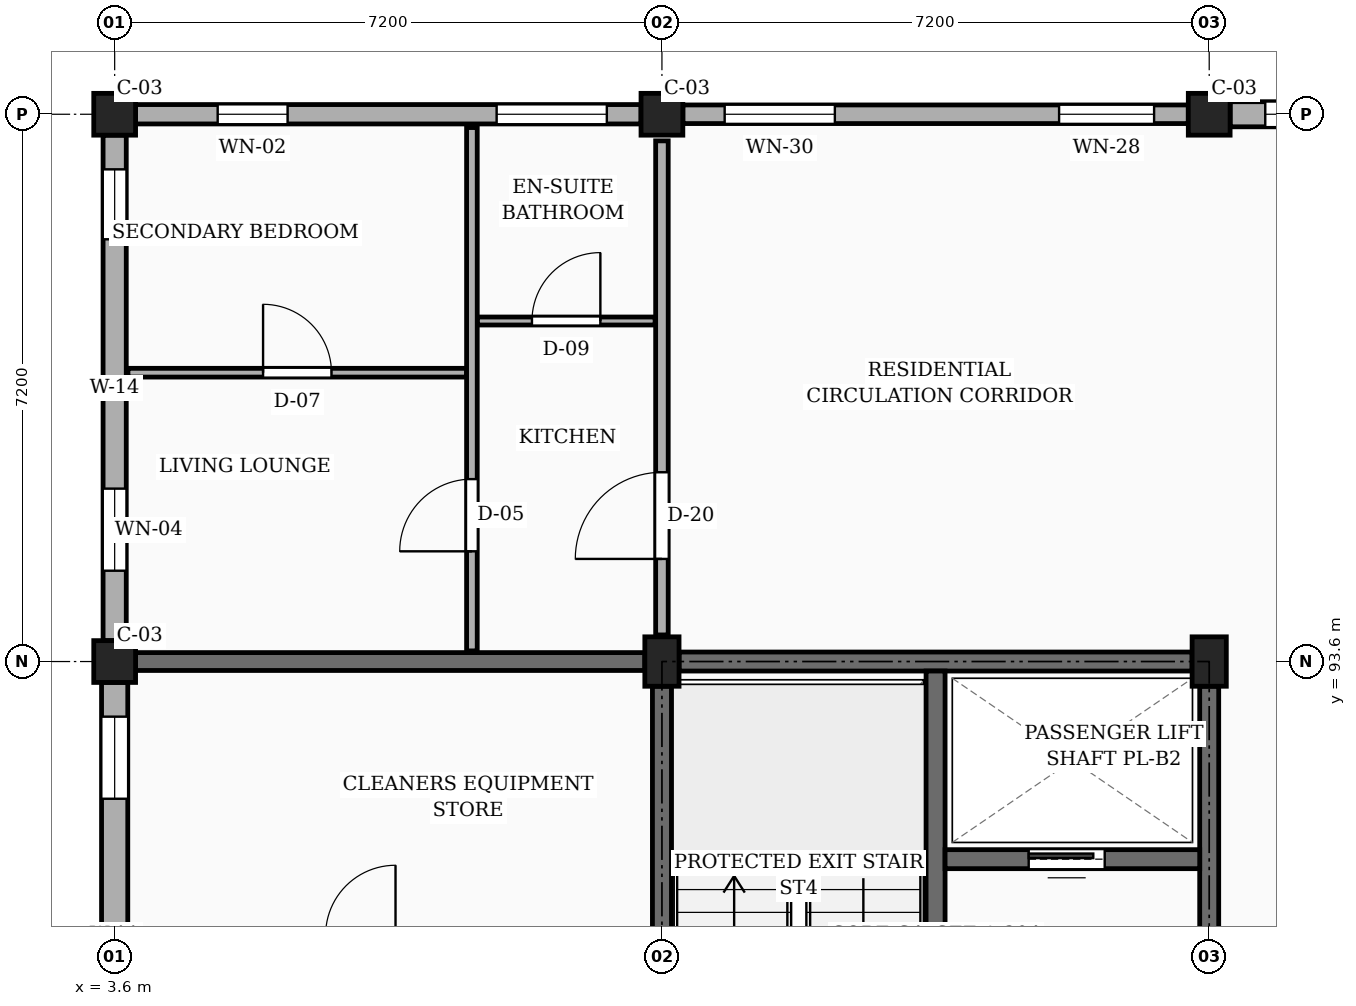
"""IFC4 building model, lengths in metres.
Left out: names, types, materials, properties, quantities, classifications, styles, units other than length and angle.
Written with IfcOpenShell. Run it as: python <this file> out.ifc"""

import sys

from ifc_helpers import new_model, si_unit, direction, frame, frame_2d, origin, origin_2d, place, context, subcontext, project, spatial, rectangle, extrude, element, fill, save


model = new_model("IFC4")
c1 = context("Model", 3, precision=1e-05, world=origin(), true_north=direction((0.0, 1.0)))
c2 = subcontext(c1, "Body", "Model", "MODEL_VIEW")
j1 = project(units=[si_unit("LENGTHUNIT", "METRE"), si_unit("PLANEANGLEUNIT", "RADIAN")], contexts=[c1])
p1 = place(None, origin())
s1 = spatial("IfcSite", under=j1, at=p1, CompositionType="ELEMENT")
p2 = place(p1, origin())
s2 = spatial("IfcBuilding", under=s1, at=p2, CompositionType="ELEMENT")
p3 = place(p2, frame((0.0, 0.0, 17.1)))
s3 = spatial("IfcBuildingStorey", under=s2, at=p3, CompositionType="ELEMENT", Elevation=17.1)
for number, where, z_axis, x_axis in (
    (1, (3.6, 93.6, 0.0), (0.0, 0.0, 1.0), (1.0, 0.0, 0.0)),
    (2, (3.6, 100.8, 0.0), (0.0, 0.0, 1.0), (1.0, 0.0, 0.0)),
):
    element("IfcColumn", number, at=place(p3, frame(where, z_axis=z_axis, x_axis=x_axis)), inside=s3, PredefinedType="COLUMN", context=c2, shape_type="SweptSolid", body=[
        extrude(rectangle(XDim=0.55, YDim=0.55, at=origin_2d()), origin(), (0.0, 0.0, 1.0), 3.15),
    ])
p4 = place(p3, frame((10.8, 93.6, 0.0), z_axis=(0.0, 0.0, 1.0), x_axis=(1.0, 0.0, 0.0)))
e3 = element("IfcColumn", 3, at=p4, inside=s3, PredefinedType="COLUMN", context=c2, shape_type="SweptSolid", body=[
    extrude(rectangle(XDim=0.45, YDim=0.65, at=origin_2d()), origin(), (0.0, 0.0, 1.0), 3.15),
])
p5 = place(p3, frame((10.8, 100.8, 0.0), z_axis=(0.0, 0.0, 1.0), x_axis=(1.0, 0.0, 0.0)))
e4 = element("IfcColumn", 4, at=p5, inside=s3, PredefinedType="COLUMN", context=c2, shape_type="SweptSolid", body=[
    extrude(rectangle(XDim=0.55, YDim=0.55, at=origin_2d()), origin(), (0.0, 0.0, 1.0), 3.15),
])
p6 = place(p3, frame((18.0, 93.6, 0.0), z_axis=(0.0, 0.0, 1.0), x_axis=(1.0, 0.0, 0.0)))
e5 = element("IfcColumn", 5, at=p6, inside=s3, PredefinedType="COLUMN", context=c2, shape_type="SweptSolid", body=[
    extrude(rectangle(XDim=0.45, YDim=0.65, at=origin_2d()), origin(), (0.0, 0.0, 1.0), 3.15),
])
p7 = place(p3, frame((18.0, 100.8, 0.0), z_axis=(0.0, 0.0, 1.0), x_axis=(1.0, 0.0, 0.0)))
e6 = element("IfcColumn", 6, at=p7, inside=s3, PredefinedType="COLUMN", context=c2, shape_type="SweptSolid", body=[
    extrude(rectangle(XDim=0.55, YDim=0.55, at=origin_2d()), origin(), (0.0, 0.0, 1.0), 3.15),
])
p8 = place(p3, frame((3.875, 93.6, 0.0), z_axis=(0.0, 0.0, 1.0), x_axis=(1.0, 0.0, 0.0)))
e7 = element("IfcWall", 7, at=p8, inside=s3, PredefinedType="SOLIDWALL", context=c2, shape_type="SweptSolid", body=[
    extrude(rectangle(XDim=6.7, YDim=0.235, at=frame_2d((3.35, 0.0))), origin(), (0.0, 0.0, 1.0), 2.21),
])
p9 = place(p3, frame((24.925, 100.8, 0.0), z_axis=(0.0, 0.0, 1.0), x_axis=(-1.0, 0.0, 0.0)))
e8 = element("IfcWall", 8, at=p9, inside=s3, PredefinedType="SOLIDWALL", context=c2, shape_type="SweptSolid", body=[
    extrude(rectangle(XDim=6.65, YDim=0.33, at=frame_2d((3.325, 0.0))), origin(), (0.0, 0.0, 1.0), 2.48),
])
p10 = place(p9, frame((1.042, 0.0, 0.78)))
e9 = element("IfcOpeningElement", 9, at=p10, cuts=e8, PredefinedType="OPENING", context=c2, shape_type="SweptSolid", body=[
    extrude(rectangle(XDim=0.94, YDim=1.44, at=frame_2d((0.47, 0.72))), frame((0.0, 0.175, 0.0), z_axis=(0.0, -1.0, 0.0), x_axis=(1.0, 0.0, 0.0)), (0.0, 0.0, 1.0), 0.35),
])
p11 = place(p9, frame((3.28, 0.0, 0.78)))
e10 = element("IfcOpeningElement", 10, at=p11, cuts=e8, PredefinedType="OPENING", context=c2, shape_type="SweptSolid", body=[
    extrude(rectangle(XDim=1.15, YDim=1.44, at=frame_2d((0.575, 0.72))), frame((0.0, 0.175, 0.0), z_axis=(0.0, -1.0, 0.0), x_axis=(1.0, 0.0, 0.0)), (0.0, 0.0, 1.0), 0.35),
])
p12 = place(p9, frame((5.147, 0.0, 0.78)))
e11 = element("IfcOpeningElement", 11, at=p12, cuts=e8, PredefinedType="OPENING", context=c2, shape_type="SweptSolid", body=[
    extrude(rectangle(XDim=1.04, YDim=1.26, at=frame_2d((0.52, 0.63))), frame((0.0, 0.175, 0.0), z_axis=(0.0, -1.0, 0.0), x_axis=(1.0, 0.0, 0.0)), (0.0, 0.0, 1.0), 0.35),
])
p13 = place(p3, frame((17.725, 100.8, 0.0), z_axis=(0.0, 0.0, 1.0), x_axis=(-1.0, 0.0, 0.0)))
e12 = element("IfcWall", 12, at=p13, inside=s3, PredefinedType="SOLIDWALL", context=c2, shape_type="SweptSolid", body=[
    extrude(rectangle(XDim=6.65, YDim=0.245, at=frame_2d((3.325, 0.0))), origin(), (0.0, 0.0, 1.0), 2.48),
])
p14 = place(p13, frame((0.45, 0.0, 0.78)))
e13 = element("IfcOpeningElement", 13, at=p14, cuts=e12, PredefinedType="OPENING", context=c2, shape_type="SweptSolid", body=[
    extrude(rectangle(XDim=1.25, YDim=1.44, at=frame_2d((0.625, 0.72))), frame((0.0, 0.133, 0.0), z_axis=(0.0, -1.0, 0.0), x_axis=(1.0, 0.0, 0.0)), (0.0, 0.0, 1.0), 0.265),
])
p15 = place(p13, frame((4.65, 0.0, 0.78)))
e14 = element("IfcOpeningElement", 14, at=p15, cuts=e12, PredefinedType="OPENING", context=c2, shape_type="SweptSolid", body=[
    extrude(rectangle(XDim=1.45, YDim=1.44, at=frame_2d((0.725, 0.72))), frame((0.0, 0.133, 0.0), z_axis=(0.0, -1.0, 0.0), x_axis=(1.0, 0.0, 0.0)), (0.0, 0.0, 1.0), 0.265),
])
p16 = place(p3, frame((10.525, 100.8, 0.0), z_axis=(0.0, 0.0, 1.0), x_axis=(-1.0, 0.0, 0.0)))
e15 = element("IfcWall", 15, at=p16, inside=s3, PredefinedType="SOLIDWALL", context=c2, shape_type="SweptSolid", body=[
    extrude(rectangle(XDim=6.65, YDim=0.255, at=frame_2d((3.325, 0.0))), origin(), (0.0, 0.0, 1.0), 2.48),
])
p17 = place(p16, frame((0.45, 0.0, 0.78)))
e16 = element("IfcOpeningElement", 16, at=p17, cuts=e15, PredefinedType="OPENING", context=c2, shape_type="SweptSolid", body=[
    extrude(rectangle(XDim=1.45, YDim=1.44, at=frame_2d((0.725, 0.72))), frame((0.0, 0.137, 0.0), z_axis=(0.0, -1.0, 0.0), x_axis=(1.0, 0.0, 0.0)), (0.0, 0.0, 1.0), 0.275),
])
p18 = place(p16, frame((4.65, 0.0, 0.78)))
e17 = element("IfcOpeningElement", 17, at=p18, cuts=e15, PredefinedType="OPENING", context=c2, shape_type="SweptSolid", body=[
    extrude(rectangle(XDim=0.92, YDim=1.15, at=frame_2d((0.46, 0.575))), frame((0.0, 0.137, 0.0), z_axis=(0.0, -1.0, 0.0), x_axis=(1.0, 0.0, 0.0)), (0.0, 0.0, 1.0), 0.275),
])
p19 = place(p3, frame((3.6, 100.525, 0.0), z_axis=(0.0, 0.0, 1.0), x_axis=(0.0, -1.0, 0.0)))
e18 = element("IfcWall", 18, at=p19, inside=s3, PredefinedType="SOLIDWALL", context=c2, shape_type="SweptSolid", body=[
    extrude(rectangle(XDim=6.65, YDim=0.305, at=frame_2d((3.325, 0.0))), origin(), (0.0, 0.0, 1.0), 2.48),
])
p20 = place(p19, frame((0.45, 0.0, 0.78)))
e19 = element("IfcOpeningElement", 19, at=p20, cuts=e18, PredefinedType="OPENING", context=c2, shape_type="SweptSolid", body=[
    extrude(rectangle(XDim=0.92, YDim=1.15, at=frame_2d((0.46, 0.575))), frame((0.0, 0.163, 0.0), z_axis=(0.0, -1.0, 0.0), x_axis=(1.0, 0.0, 0.0)), (0.0, 0.0, 1.0), 0.325),
])
p21 = place(p19, frame((4.65, 0.0, 0.78)))
e20 = element("IfcOpeningElement", 20, at=p21, cuts=e18, PredefinedType="OPENING", context=c2, shape_type="SweptSolid", body=[
    extrude(rectangle(XDim=1.08, YDim=1.15, at=frame_2d((0.54, 0.575))), frame((0.0, 0.163, 0.0), z_axis=(0.0, -1.0, 0.0), x_axis=(1.0, 0.0, 0.0)), (0.0, 0.0, 1.0), 0.325),
])
p22 = place(p3, frame((3.6, 93.325, 0.0), z_axis=(0.0, 0.0, 1.0), x_axis=(0.0, -1.0, 0.0)))
e21 = element("IfcWall", 21, at=p22, inside=s3, PredefinedType="SOLIDWALL", context=c2, shape_type="SweptSolid", body=[
    extrude(rectangle(XDim=6.65, YDim=0.345, at=frame_2d((3.325, 0.0))), origin(), (0.0, 0.0, 1.0), 2.48),
])
p23 = place(p22, frame((0.45, 0.0, 0.78)))
e22 = element("IfcOpeningElement", 22, at=p23, cuts=e21, PredefinedType="OPENING", context=c2, shape_type="SweptSolid", body=[
    extrude(rectangle(XDim=1.08, YDim=1.15, at=frame_2d((0.54, 0.575))), frame((0.0, 0.183, 0.0), z_axis=(0.0, -1.0, 0.0), x_axis=(1.0, 0.0, 0.0)), (0.0, 0.0, 1.0), 0.365),
])
p24 = place(p22, frame((4.65, 0.0, 0.78)))
e23 = element("IfcOpeningElement", 23, at=p24, cuts=e21, PredefinedType="OPENING", context=c2, shape_type="SweptSolid", body=[
    extrude(rectangle(XDim=1.24, YDim=1.15, at=frame_2d((0.62, 0.575))), frame((0.0, 0.183, 0.0), z_axis=(0.0, -1.0, 0.0), x_axis=(1.0, 0.0, 0.0)), (0.0, 0.0, 1.0), 0.365),
])
p25 = place(p3, frame((10.8, 86.725, 0.0), z_axis=(0.0, 0.0, 1.0), x_axis=(0.0, 1.0, 0.0)))
e24 = element("IfcWall", 24, at=p25, inside=s3, PredefinedType="SHEAR", context=c2, shape_type="SweptSolid", body=[
    extrude(rectangle(XDim=6.55, YDim=0.25, at=frame_2d((3.275, 0.0))), origin(), (0.0, 0.0, 1.0), 2.91),
])
p26 = place(p3, frame((11.025, 93.6, 0.0), z_axis=(0.0, 0.0, 1.0), x_axis=(1.0, 0.0, 0.0)))
e25 = element("IfcWall", 25, at=p26, inside=s3, PredefinedType="SHEAR", context=c2, shape_type="SweptSolid", body=[
    extrude(rectangle(XDim=6.75, YDim=0.25, at=frame_2d((3.375, 0.0))), origin(), (0.0, 0.0, 1.0), 2.91),
])
p27 = place(p3, frame((18.0, 86.725, 0.0), z_axis=(0.0, 0.0, 1.0), x_axis=(0.0, 1.0, 0.0)))
e26 = element("IfcWall", 26, at=p27, inside=s3, PredefinedType="SHEAR", context=c2, shape_type="SweptSolid", body=[
    extrude(rectangle(XDim=6.55, YDim=0.25, at=frame_2d((3.275, 0.0))), origin(), (0.0, 0.0, 1.0), 2.91),
])
p28 = place(p27, frame((1.5, 0.0, 0.0)))
e27 = element("IfcOpeningElement", 27, at=p28, cuts=e26, PredefinedType="OPENING", context=c2, shape_type="SweptSolid", body=[
    extrude(rectangle(XDim=1.1, YDim=2.15, at=frame_2d((0.55, 1.075))), frame((0.0, 0.135, 0.0), z_axis=(0.0, -1.0, 0.0), x_axis=(1.0, 0.0, 0.0)), (0.0, 0.0, 1.0), 0.27),
])
p29 = place(p3, frame((14.4, 86.525, 0.0), z_axis=(0.0, 0.0, 1.0), x_axis=(0.0, 1.0, 0.0)))
e28 = element("IfcWall", 28, at=p29, inside=s3, PredefinedType="SHEAR", context=c2, shape_type="SweptSolid", body=[
    extrude(rectangle(XDim=6.95, YDim=0.25, at=frame_2d((3.475, 0.0))), origin(), (0.0, 0.0, 1.0), 2.91),
])
p30 = place(p29, frame((0.475, 0.0, 0.0)))
e29 = element("IfcOpeningElement", 29, at=p30, cuts=e28, PredefinedType="OPENING", context=c2, shape_type="SweptSolid", body=[
    extrude(rectangle(XDim=1.05, YDim=2.15, at=frame_2d((0.525, 1.075))), frame((0.0, 0.135, 0.0), z_axis=(0.0, -1.0, 0.0), x_axis=(1.0, 0.0, 0.0)), (0.0, 0.0, 1.0), 0.27),
])
p31 = place(p3, frame((14.525, 91.0, 0.0), z_axis=(0.0, 0.0, 1.0), x_axis=(1.0, 0.0, 0.0)))
e30 = element("IfcWall", 30, at=p31, inside=s3, PredefinedType="SHEAR", context=c2, shape_type="SweptSolid", body=[
    extrude(rectangle(XDim=3.35, YDim=0.25, at=frame_2d((1.675, 0.0))), origin(), (0.0, 0.0, 1.0), 2.91),
])
p32 = place(p31, frame((1.1, 0.0, 0.0)))
e31 = element("IfcOpeningElement", 31, at=p32, cuts=e30, PredefinedType="OPENING", context=c2, shape_type="SweptSolid", body=[
    extrude(rectangle(XDim=1.0, YDim=2.2, at=frame_2d((0.5, 1.1))), frame((0.0, 0.135, 0.0), z_axis=(0.0, -1.0, 0.0), x_axis=(1.0, 0.0, 0.0)), (0.0, 0.0, 1.0), 0.27),
])
p33 = place(p3, frame((10.8, 93.95, 0.0), z_axis=(0.0, 0.0, 1.0), x_axis=(0.0, 1.0, 0.0)))
e32 = element("IfcWall", 32, at=p33, inside=s3, PredefinedType="PARTITIONING", context=c2, shape_type="SweptSolid", body=[
    extrude(rectangle(XDim=6.5, YDim=0.165, at=frame_2d((3.25, 0.0))), origin(), (0.0, 0.0, 1.0), 2.345),
])
p34 = place(p33, frame((1.0, 0.0, 0.0)))
e33 = element("IfcOpeningElement", 33, at=p34, cuts=e32, PredefinedType="OPENING", context=c2, shape_type="SweptSolid", body=[
    extrude(rectangle(XDim=1.14, YDim=2.18, at=frame_2d((0.57, 1.09))), frame((0.0, 0.093, 0.0), z_axis=(0.0, -1.0, 0.0), x_axis=(1.0, 0.0, 0.0)), (0.0, 0.0, 1.0), 0.185),
])
p35 = place(p3, frame((3.775, 97.4, 0.0), z_axis=(0.0, 0.0, 1.0), x_axis=(1.0, 0.0, 0.0)))
e34 = element("IfcWall", 34, at=p35, inside=s3, PredefinedType="PARTITIONING", context=c2, shape_type="SweptSolid", body=[
    extrude(rectangle(XDim=4.455, YDim=0.115, at=frame_2d((2.228, 0.0))), origin(), (0.0, 0.0, 1.0), 2.345),
])
p36 = place(p35, frame((1.778, 0.0, 0.0)))
e35 = element("IfcOpeningElement", 35, at=p36, cuts=e34, PredefinedType="OPENING", context=c2, shape_type="SweptSolid", body=[
    extrude(rectangle(XDim=0.9, YDim=2.1, at=frame_2d((0.45, 1.05))), frame((0.0, 0.067, 0.0), z_axis=(0.0, -1.0, 0.0), x_axis=(1.0, 0.0, 0.0)), (0.0, 0.0, 1.0), 0.135),
])
p37 = place(p3, frame((8.37, 98.08, 0.0), z_axis=(0.0, 0.0, 1.0), x_axis=(1.0, 0.0, 0.0)))
e36 = element("IfcWall", 36, at=p37, inside=s3, PredefinedType="PARTITIONING", context=c2, shape_type="SweptSolid", body=[
    extrude(rectangle(XDim=2.34, YDim=0.105, at=frame_2d((1.17, 0.0))), origin(), (0.0, 0.0, 1.0), 2.345),
])
p38 = place(p37, frame((0.72, 0.0, 0.0)))
e37 = element("IfcOpeningElement", 37, at=p38, cuts=e36, PredefinedType="OPENING", context=c2, shape_type="SweptSolid", body=[
    extrude(rectangle(XDim=0.9, YDim=2.05, at=frame_2d((0.45, 1.025))), frame((0.0, 0.062, 0.0), z_axis=(0.0, -1.0, 0.0), x_axis=(1.0, 0.0, 0.0)), (0.0, 0.0, 1.0), 0.125),
])
p39 = place(p3, frame((8.3, 93.74, 0.0), z_axis=(0.0, 0.0, 1.0), x_axis=(0.0, 1.0, 0.0)))
e38 = element("IfcWall", 38, at=p39, inside=s3, PredefinedType="PARTITIONING", context=c2, shape_type="SweptSolid", body=[
    extrude(rectangle(XDim=6.885, YDim=0.14, at=frame_2d((3.442, 0.0))), origin(), (0.0, 0.0, 1.0), 2.345),
])
p40 = place(p39, frame((1.31, 0.0, 0.0)))
e39 = element("IfcOpeningElement", 39, at=p40, cuts=e38, PredefinedType="OPENING", context=c2, shape_type="SweptSolid", body=[
    extrude(rectangle(XDim=0.95, YDim=2.1, at=frame_2d((0.475, 1.05))), frame((0.0, 0.08, 0.0), z_axis=(0.0, -1.0, 0.0), x_axis=(1.0, 0.0, 0.0)), (0.0, 0.0, 1.0), 0.16),
])
p41 = place(p12, origin())
e40 = element("IfcWindow", 40, at=p41, inside=s3, PartitioningType="SINGLE_PANEL", PredefinedType="WINDOW", context=c2, shape_type="SweptSolid", body=[
    extrude(rectangle(XDim=1.04, YDim=1.26, at=frame_2d((0.52, 0.63))), frame((0.0, 0.03, 0.0), z_axis=(0.0, -1.0, 0.0), x_axis=(1.0, 0.0, 0.0)), (0.0, 0.0, 1.0), 0.06),
])
fill(e11, e40)
p42 = place(p14, origin())
e41 = element("IfcWindow", 41, at=p42, inside=s3, PartitioningType="SINGLE_PANEL", PredefinedType="WINDOW", context=c2, shape_type="SweptSolid", body=[
    extrude(rectangle(XDim=1.25, YDim=1.44, at=frame_2d((0.625, 0.72))), frame((0.0, 0.03, 0.0), z_axis=(0.0, -1.0, 0.0), x_axis=(1.0, 0.0, 0.0)), (0.0, 0.0, 1.0), 0.06),
])
fill(e13, e41)
p43 = place(p15, origin())
e42 = element("IfcWindow", 42, at=p43, inside=s3, PartitioningType="SINGLE_PANEL", PredefinedType="WINDOW", context=c2, shape_type="SweptSolid", body=[
    extrude(rectangle(XDim=1.45, YDim=1.44, at=frame_2d((0.725, 0.72))), frame((0.0, 0.03, 0.0), z_axis=(0.0, -1.0, 0.0), x_axis=(1.0, 0.0, 0.0)), (0.0, 0.0, 1.0), 0.06),
])
fill(e14, e42)
p44 = place(p17, origin())
e43 = element("IfcWindow", 43, at=p44, inside=s3, PartitioningType="SINGLE_PANEL", PredefinedType="WINDOW", context=c2, shape_type="SweptSolid", body=[
    extrude(rectangle(XDim=1.45, YDim=1.44, at=frame_2d((0.725, 0.72))), frame((0.0, 0.03, 0.0), z_axis=(0.0, -1.0, 0.0), x_axis=(1.0, 0.0, 0.0)), (0.0, 0.0, 1.0), 0.06),
])
fill(e16, e43)
p45 = place(p18, origin())
e44 = element("IfcWindow", 44, at=p45, inside=s3, PartitioningType="SINGLE_PANEL", PredefinedType="WINDOW", context=c2, shape_type="SweptSolid", body=[
    extrude(rectangle(XDim=0.92, YDim=1.15, at=frame_2d((0.46, 0.575))), frame((0.0, 0.03, 0.0), z_axis=(0.0, -1.0, 0.0), x_axis=(1.0, 0.0, 0.0)), (0.0, 0.0, 1.0), 0.06),
])
fill(e17, e44)
p46 = place(p20, origin())
e45 = element("IfcWindow", 45, at=p46, inside=s3, PartitioningType="SINGLE_PANEL", PredefinedType="WINDOW", context=c2, shape_type="SweptSolid", body=[
    extrude(rectangle(XDim=0.92, YDim=1.15, at=frame_2d((0.46, 0.575))), frame((0.0, 0.03, 0.0), z_axis=(0.0, -1.0, 0.0), x_axis=(1.0, 0.0, 0.0)), (0.0, 0.0, 1.0), 0.06),
])
fill(e19, e45)
p47 = place(p21, origin())
e46 = element("IfcWindow", 46, at=p47, inside=s3, PartitioningType="SINGLE_PANEL", PredefinedType="WINDOW", context=c2, shape_type="SweptSolid", body=[
    extrude(rectangle(XDim=1.08, YDim=1.15, at=frame_2d((0.54, 0.575))), frame((0.0, 0.03, 0.0), z_axis=(0.0, -1.0, 0.0), x_axis=(1.0, 0.0, 0.0)), (0.0, 0.0, 1.0), 0.06),
])
fill(e20, e46)
p48 = place(p23, origin())
e47 = element("IfcWindow", 47, at=p48, inside=s3, PartitioningType="SINGLE_PANEL", PredefinedType="WINDOW", context=c2, shape_type="SweptSolid", body=[
    extrude(rectangle(XDim=1.08, YDim=1.15, at=frame_2d((0.54, 0.575))), frame((0.0, 0.03, 0.0), z_axis=(0.0, -1.0, 0.0), x_axis=(1.0, 0.0, 0.0)), (0.0, 0.0, 1.0), 0.06),
])
fill(e22, e47)
p49 = place(p32, origin())
e48 = element("IfcDoor", 48, at=p49, inside=s3, OperationType="SLIDING_TO_LEFT", PredefinedType="DOOR", context=c2, shape_type="SweptSolid", body=[
    extrude(rectangle(XDim=1.0, YDim=2.2, at=frame_2d((0.5, 1.1))), frame((0.0, 0.025, 0.0), z_axis=(0.0, -1.0, 0.0), x_axis=(1.0, 0.0, 0.0)), (0.0, 0.0, 1.0), 0.05),
])
fill(e31, e48)
p50 = place(p34, origin())
e49 = element("IfcDoor", 49, at=p50, inside=s3, OperationType="SINGLE_SWING_LEFT", PredefinedType="DOOR", context=c2, shape_type="SweptSolid", body=[
    extrude(rectangle(XDim=1.14, YDim=2.18, at=frame_2d((0.57, 1.09))), frame((0.0, 0.025, 0.0), z_axis=(0.0, -1.0, 0.0), x_axis=(1.0, 0.0, 0.0)), (0.0, 0.0, 1.0), 0.05),
])
fill(e33, e49)
p51 = place(p36, origin())
e50 = element("IfcDoor", 50, at=p51, inside=s3, OperationType="SINGLE_SWING_LEFT", PredefinedType="DOOR", context=c2, shape_type="SweptSolid", body=[
    extrude(rectangle(XDim=0.9, YDim=2.1, at=frame_2d((0.45, 1.05))), frame((0.0, 0.025, 0.0), z_axis=(0.0, -1.0, 0.0), x_axis=(1.0, 0.0, 0.0)), (0.0, 0.0, 1.0), 0.05),
])
fill(e35, e50)
p52 = place(p38, origin())
e51 = element("IfcDoor", 51, at=p52, inside=s3, OperationType="SINGLE_SWING_RIGHT", PredefinedType="DOOR", context=c2, shape_type="SweptSolid", body=[
    extrude(rectangle(XDim=0.9, YDim=2.05, at=frame_2d((0.45, 1.025))), frame((0.0, 0.025, 0.0), z_axis=(0.0, -1.0, 0.0), x_axis=(1.0, 0.0, 0.0)), (0.0, 0.0, 1.0), 0.05),
])
fill(e37, e51)
p53 = place(p40, origin())
e52 = element("IfcDoor", 52, at=p53, inside=s3, OperationType="SINGLE_SWING_LEFT", PredefinedType="DOOR", context=c2, shape_type="SweptSolid", body=[
    extrude(rectangle(XDim=0.95, YDim=2.1, at=frame_2d((0.475, 1.05))), frame((0.0, 0.025, 0.0), z_axis=(0.0, -1.0, 0.0), x_axis=(1.0, 0.0, 0.0)), (0.0, 0.0, 1.0), 0.05),
])
fill(e39, e52)
save(model, sys.argv[1])
